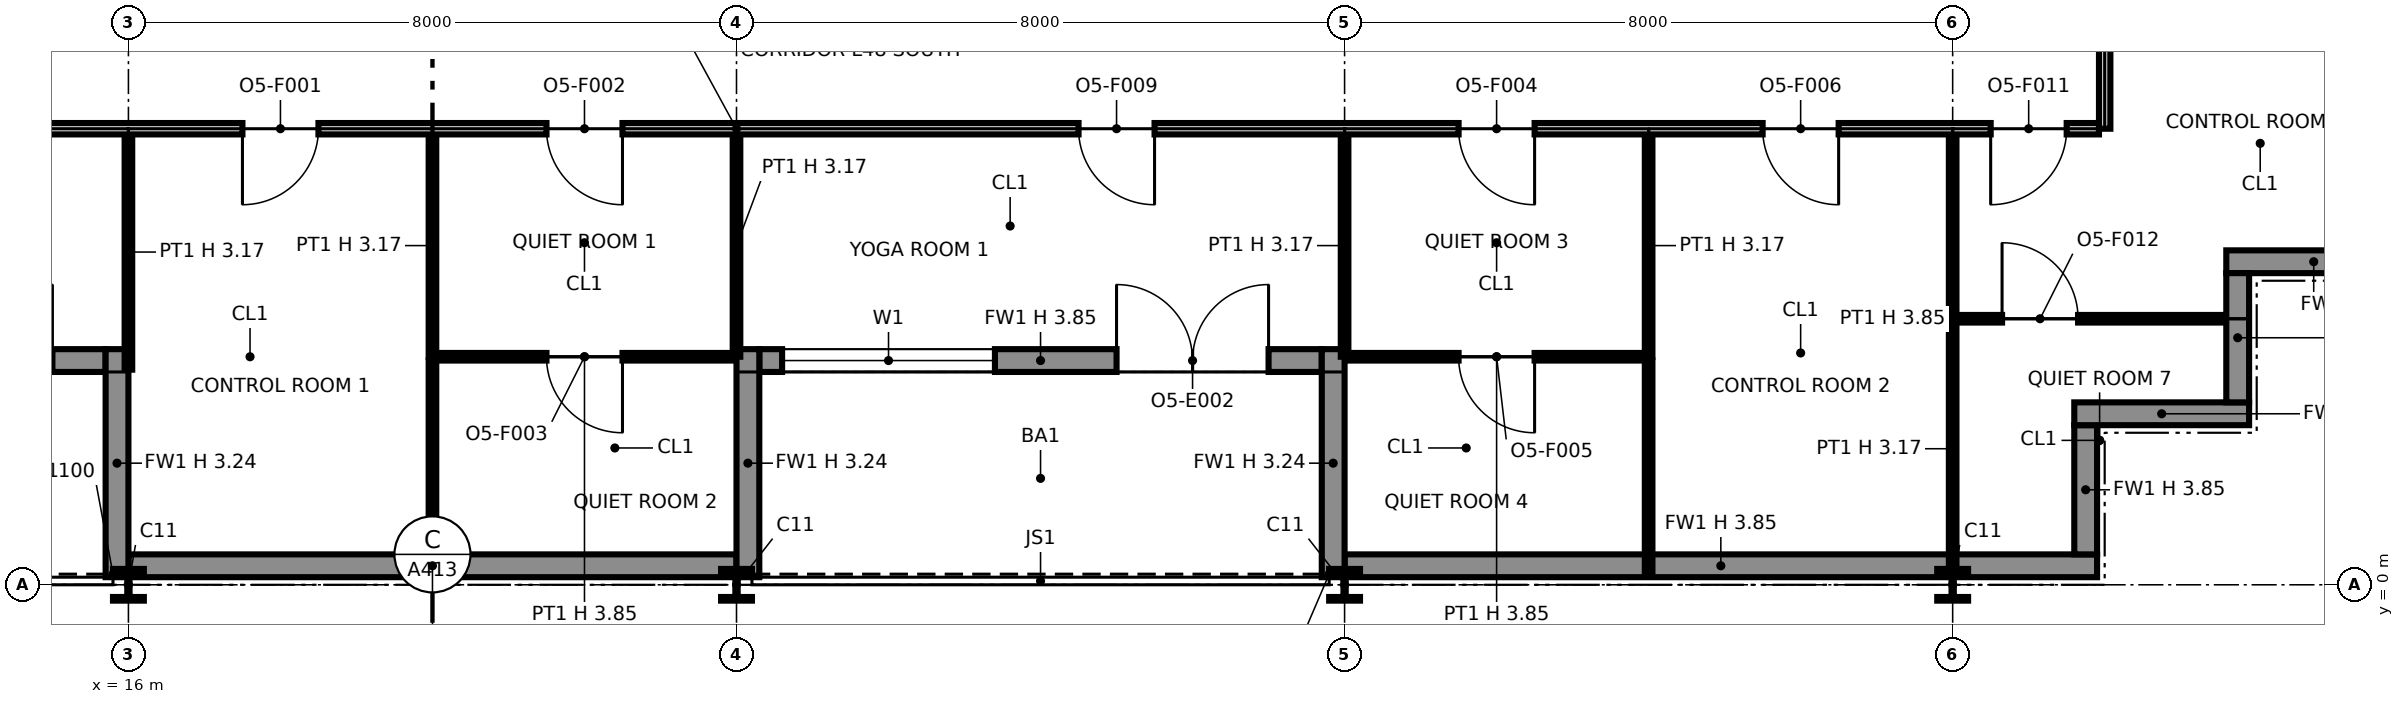
"""IFC4 building model, lengths in metres.
Left out: names, types, materials, properties, quantities, classifications, styles, units other than length and angle.
Written with IfcOpenShell. Run it as: python <this file> out.ifc"""

import sys

from ifc_helpers import new_model, si_unit, direction, frame, frame_2d, origin, origin_2d, place, context, subcontext, project, spatial, polyline, rectangle, i_section, outline, extrude, element, fill, save


model = new_model("IFC4")
c1 = context("Model", 3, precision=1e-05, world=origin(), true_north=direction((0.0, 1.0)))
c2 = subcontext(c1, "Body", "Model", "MODEL_VIEW")
j1 = project(units=[si_unit("LENGTHUNIT", "METRE"), si_unit("PLANEANGLEUNIT", "RADIAN")], contexts=[c1])
p1 = place(None, origin())
s1 = spatial("IfcSite", under=j1, at=p1, CompositionType="ELEMENT")
p2 = place(p1, origin())
s2 = spatial("IfcBuilding", under=s1, at=p2, CompositionType="ELEMENT")
p3 = place(p2, frame((0.0, 0.0, 225.0)))
s3 = spatial("IfcBuildingStorey", under=s2, at=p3, CompositionType="ELEMENT", Elevation=225.0)
for number, where, z_axis, x_axis in (
    (1, (16.0, 0.0, 0.0), (0.0, 0.0, 1.0), (1.0, 0.0, 0.0)),
    (2, (24.0, 0.0, 0.0), (0.0, 0.0, 1.0), (1.0, 0.0, 0.0)),
    (3, (32.0, 0.0, 0.0), (0.0, 0.0, 1.0), (1.0, 0.0, 0.0)),
    (4, (40.0, 0.0, 0.0), (0.0, 0.0, 1.0), (1.0, 0.0, 0.0)),
):
    element("IfcColumn", number, at=place(p3, frame(where, z_axis=z_axis, x_axis=x_axis)), inside=s3, PredefinedType="COLUMN", context=c2, shape_type="SweptSolid", body=[
        extrude(i_section(OverallWidth=0.406, OverallDepth=0.417, WebThickness=0.03, FlangeThickness=0.048, at=origin_2d()), origin(), (0.0, 0.0, 1.0), 3.85),
    ])
p4 = place(p3, frame((8.3, 2.95, 0.0), z_axis=(0.0, 0.0, 1.0), x_axis=(1.0, 0.0, 0.0)))
e5 = element("IfcWall", 5, at=p4, inside=s3, PredefinedType="SOLIDWALL", context=c2, shape_type="SweptSolid", body=[
    extrude(rectangle(XDim=7.4, YDim=0.3, at=frame_2d((3.7, 0.0))), origin(), (0.0, 0.0, 1.0), 3.85),
])
p5 = place(p4, frame((0.3, 0.0, 0.9)))
e6 = element("IfcOpeningElement", 6, at=p5, cuts=e5, PredefinedType="OPENING", context=c2, shape_type="SweptSolid", body=[
    extrude(rectangle(XDim=2.8, YDim=2.2, at=frame_2d((1.4, 1.1))), frame((0.0, 0.16, 0.0), z_axis=(0.0, -1.0, 0.0), x_axis=(1.0, 0.0, 0.0)), (0.0, 0.0, 1.0), 0.32),
])
p6 = place(p4, frame((4.7, 0.0, 0.0)))
e7 = element("IfcOpeningElement", 7, at=p6, cuts=e5, PredefinedType="OPENING", context=c2, shape_type="SweptSolid", body=[
    extrude(rectangle(XDim=2.0, YDim=2.4, at=frame_2d((1.0, 1.2))), frame((0.0, 0.16, 0.0), z_axis=(0.0, -1.0, 0.0), x_axis=(1.0, 0.0, 0.0)), (0.0, 0.0, 1.0), 0.32),
])
p7 = place(p3, frame((15.85, 0.1, 0.0), z_axis=(0.0, 0.0, 1.0), x_axis=(0.0, 1.0, 0.0)))
e8 = element("IfcWall", 8, at=p7, inside=s3, PredefinedType="SOLIDWALL", context=c2, shape_type="SweptSolid", body=[
    extrude(rectangle(XDim=3.0, YDim=0.3, at=frame_2d((1.5, 0.0))), origin(), (0.0, 0.0, 1.0), 3.237),
])
p8 = place(p3, frame((16.0, 0.25, 0.0), z_axis=(0.0, 0.0, 1.0), x_axis=(1.0, 0.0, 0.0)))
e9 = element("IfcWall", 9, at=p8, inside=s3, PredefinedType="SOLIDWALL", context=c2, shape_type="SweptSolid", body=[
    extrude(rectangle(XDim=8.0, YDim=0.3, at=frame_2d((4.0, 0.0))), origin(), (0.0, 0.0, 1.0), 3.85),
])
p9 = place(p3, frame((24.3, 2.95, 0.0), z_axis=(0.0, 0.0, 1.0), x_axis=(1.0, 0.0, 0.0)))
e10 = element("IfcWall", 10, at=p9, inside=s3, PredefinedType="SOLIDWALL", context=c2, shape_type="SweptSolid", body=[
    extrude(rectangle(XDim=7.4, YDim=0.3, at=frame_2d((3.7, 0.0))), origin(), (0.0, 0.0, 1.0), 3.85),
])
p10 = place(p9, frame((0.3, 0.0, 0.9)))
e11 = element("IfcOpeningElement", 11, at=p10, cuts=e10, PredefinedType="OPENING", context=c2, shape_type="SweptSolid", body=[
    extrude(rectangle(XDim=2.8, YDim=2.2, at=frame_2d((1.4, 1.1))), frame((0.0, 0.16, 0.0), z_axis=(0.0, -1.0, 0.0), x_axis=(1.0, 0.0, 0.0)), (0.0, 0.0, 1.0), 0.32),
])
p11 = place(p9, frame((4.7, 0.0, 0.0)))
e12 = element("IfcOpeningElement", 12, at=p11, cuts=e10, PredefinedType="OPENING", context=c2, shape_type="SweptSolid", body=[
    extrude(rectangle(XDim=2.0, YDim=2.4, at=frame_2d((1.0, 1.2))), frame((0.0, 0.16, 0.0), z_axis=(0.0, -1.0, 0.0), x_axis=(1.0, 0.0, 0.0)), (0.0, 0.0, 1.0), 0.32),
])
for number, where, z_axis, x_axis in (
    (13, (24.15, 0.1, 0.0), (0.0, 0.0, 1.0), (0.0, 1.0, 0.0)),
    (14, (31.85, 0.1, 0.0), (0.0, 0.0, 1.0), (0.0, 1.0, 0.0)),
):
    element("IfcWall", number, at=place(p3, frame(where, z_axis=z_axis, x_axis=x_axis)), inside=s3, PredefinedType="SOLIDWALL", context=c2, shape_type="SweptSolid", body=[
        extrude(rectangle(XDim=3.0, YDim=0.3, at=frame_2d((1.5, 0.0))), origin(), (0.0, 0.0, 1.0), 3.237),
    ])
p12 = place(p3, frame((32.0, 0.25, 0.0), z_axis=(0.0, 0.0, 1.0), x_axis=(1.0, 0.0, 0.0)))
e15 = element("IfcWall", 15, at=p12, inside=s3, PredefinedType="SOLIDWALL", context=c2, shape_type="SweptSolid", body=[
    extrude(rectangle(XDim=9.9, YDim=0.3, at=frame_2d((4.95, 0.0))), origin(), (0.0, 0.0, 1.0), 3.85),
])
p13 = place(p3, frame((41.75, 0.4, 0.0), z_axis=(0.0, 0.0, 1.0), x_axis=(0.0, 1.0, 0.0)))
e16 = element("IfcWall", 16, at=p13, inside=s3, PredefinedType="SOLIDWALL", context=c2, shape_type="SweptSolid", body=[
    extrude(rectangle(XDim=1.7, YDim=0.3, at=frame_2d((0.85, 0.0))), origin(), (0.0, 0.0, 1.0), 3.85),
])
p14 = place(p3, frame((41.6, 2.25, 0.0), z_axis=(0.0, 0.0, 1.0), x_axis=(1.0, 0.0, 0.0)))
e17 = element("IfcWall", 17, at=p14, inside=s3, PredefinedType="SOLIDWALL", context=c2, shape_type="SweptSolid", body=[
    extrude(rectangle(XDim=2.3, YDim=0.3, at=frame_2d((1.15, 0.0))), origin(), (0.0, 0.0, 1.0), 3.85),
])
p15 = place(p3, frame((43.75, 2.4, 0.0), z_axis=(0.0, 0.0, 1.0), x_axis=(0.0, 1.0, 0.0)))
e18 = element("IfcWall", 18, at=p15, inside=s3, PredefinedType="SOLIDWALL", context=c2, shape_type="SweptSolid", body=[
    extrude(rectangle(XDim=1.7, YDim=0.3, at=frame_2d((0.85, 0.0))), origin(), (0.0, 0.0, 1.0), 3.85),
])
p16 = place(p3, frame((43.6, 4.25, 0.0), z_axis=(0.0, 0.0, 1.0), x_axis=(1.0, 0.0, 0.0)))
e19 = element("IfcWall", 19, at=p16, inside=s3, PredefinedType="SOLIDWALL", context=c2, shape_type="SweptSolid", body=[
    extrude(rectangle(XDim=2.3, YDim=0.3, at=frame_2d((1.15, 0.0))), origin(), (0.0, 0.0, 1.0), 3.85),
])
for number, where, z_axis, x_axis in (
    (20, (20.0, 0.13, 0.0), (0.0, 0.0, 1.0), (0.0, 1.0, 0.0)),
    (21, (36.0, 0.13, 0.0), (0.0, 0.0, 1.0), (0.0, 1.0, 0.0)),
):
    element("IfcWall", number, at=place(p3, frame(where, z_axis=z_axis, x_axis=x_axis)), inside=s3, PredefinedType="PARTITIONING", context=c2, shape_type="SweptSolid", body=[
        extrude(rectangle(XDim=2.82, YDim=0.1, at=frame_2d((1.41, 0.0))), origin(), (0.0, 0.0, 1.0), 3.85),
    ])
p17 = place(p3, frame((40.0, 0.13, 0.0), z_axis=(0.0, 0.0, 1.0), x_axis=(0.0, 1.0, 0.0)))
e22 = element("IfcWall", 22, at=p17, inside=s3, PredefinedType="PARTITIONING", context=c2, shape_type="SweptSolid", body=[
    extrude(rectangle(XDim=3.32, YDim=0.1, at=frame_2d((1.66, 0.0))), origin(), (0.0, 0.0, 1.0), 3.172),
])
p18 = place(p3, frame((16.0, 2.83, 0.0), z_axis=(0.0, 0.0, 1.0), x_axis=(0.0, 1.0, 0.0)))
e23 = element("IfcWall", 23, at=p18, inside=s3, PredefinedType="PARTITIONING", context=c2, shape_type="SweptSolid", body=[
    extrude(rectangle(XDim=3.095, YDim=0.1, at=frame_2d((1.547, 0.0))), origin(), (0.0, 0.0, 1.0), 3.172),
])
p19 = place(p3, frame((20.05, 3.0, 0.0), z_axis=(0.0, 0.0, 1.0), x_axis=(1.0, 0.0, 0.0)))
e24 = element("IfcWall", 24, at=p19, inside=s3, PredefinedType="PARTITIONING", context=c2, shape_type="SweptSolid", body=[
    extrude(rectangle(XDim=3.9, YDim=0.1, at=frame_2d((1.95, 0.0))), origin(), (0.0, 0.0, 1.0), 3.85),
])
p20 = place(p19, frame((2.45, 0.0, 0.0), z_axis=(0.0, 0.0, 1.0), x_axis=(-1.0, 0.0, 0.0)))
e25 = element("IfcOpeningElement", 25, at=p20, cuts=e24, PredefinedType="OPENING", context=c2, shape_type="SweptSolid", body=[
    extrude(rectangle(XDim=1.0, YDim=2.1, at=frame_2d((0.5, 1.05))), frame((0.0, 0.06, 0.0), z_axis=(0.0, -1.0, 0.0), x_axis=(1.0, 0.0, 0.0)), (0.0, 0.0, 1.0), 0.12),
])
for number, where, z_axis, x_axis in (
    (26, (20.0, 3.0, 0.0), (0.0, 0.0, 1.0), (0.0, 1.0, 0.0)),
    (27, (24.0, 3.0, 0.0), (0.0, 0.0, 1.0), (0.0, 1.0, 0.0)),
):
    element("IfcWall", number, at=place(p3, frame(where, z_axis=z_axis, x_axis=x_axis)), inside=s3, PredefinedType="PARTITIONING", context=c2, shape_type="SweptSolid", body=[
        extrude(rectangle(XDim=2.925, YDim=0.1, at=frame_2d((1.462, 0.0))), origin(), (0.0, 0.0, 1.0), 3.172),
    ])
p21 = place(p3, frame((32.05, 3.0, 0.0), z_axis=(0.0, 0.0, 1.0), x_axis=(1.0, 0.0, 0.0)))
e28 = element("IfcWall", 28, at=p21, inside=s3, PredefinedType="PARTITIONING", context=c2, shape_type="SweptSolid", body=[
    extrude(rectangle(XDim=3.9, YDim=0.1, at=frame_2d((1.95, 0.0))), origin(), (0.0, 0.0, 1.0), 3.85),
])
p22 = place(p21, frame((2.45, 0.0, 0.0), z_axis=(0.0, 0.0, 1.0), x_axis=(-1.0, 0.0, 0.0)))
e29 = element("IfcOpeningElement", 29, at=p22, cuts=e28, PredefinedType="OPENING", context=c2, shape_type="SweptSolid", body=[
    extrude(rectangle(XDim=1.0, YDim=2.1, at=frame_2d((0.5, 1.05))), frame((0.0, 0.06, 0.0), z_axis=(0.0, -1.0, 0.0), x_axis=(1.0, 0.0, 0.0)), (0.0, 0.0, 1.0), 0.12),
])
for number, where, z_axis, x_axis in (
    (30, (32.0, 3.0, 0.0), (0.0, 0.0, 1.0), (0.0, 1.0, 0.0)),
    (31, (36.0, 3.0, 0.0), (0.0, 0.0, 1.0), (0.0, 1.0, 0.0)),
):
    element("IfcWall", number, at=place(p3, frame(where, z_axis=z_axis, x_axis=x_axis)), inside=s3, PredefinedType="PARTITIONING", context=c2, shape_type="SweptSolid", body=[
        extrude(rectangle(XDim=2.925, YDim=0.1, at=frame_2d((1.462, 0.0))), origin(), (0.0, 0.0, 1.0), 3.172),
    ])
p23 = place(p3, frame((40.05, 3.5, 0.0), z_axis=(0.0, 0.0, 1.0), x_axis=(1.0, 0.0, 0.0)))
e32 = element("IfcWall", 32, at=p23, inside=s3, PredefinedType="PARTITIONING", context=c2, shape_type="SweptSolid", body=[
    extrude(rectangle(XDim=3.52, YDim=0.1, at=frame_2d((1.76, 0.0))), origin(), (0.0, 0.0, 1.0), 3.85),
])
p24 = place(p23, frame((0.6, 0.0, 0.0)))
e33 = element("IfcOpeningElement", 33, at=p24, cuts=e32, PredefinedType="OPENING", context=c2, shape_type="SweptSolid", body=[
    extrude(rectangle(XDim=1.0, YDim=2.1, at=frame_2d((0.5, 1.05))), frame((0.0, 0.06, 0.0), z_axis=(0.0, -1.0, 0.0), x_axis=(1.0, 0.0, 0.0)), (0.0, 0.0, 1.0), 0.12),
])
p25 = place(p3, frame((40.0, 3.5, 0.0), z_axis=(0.0, 0.0, 1.0), x_axis=(0.0, 1.0, 0.0)))
e34 = element("IfcWall", 34, at=p25, inside=s3, PredefinedType="PARTITIONING", context=c2, shape_type="SweptSolid", body=[
    extrude(rectangle(XDim=2.425, YDim=0.1, at=frame_2d((1.212, 0.0))), origin(), (0.0, 0.0, 1.0), 3.172),
])
p26 = place(p3, frame((6.075, 6.0, 0.0), z_axis=(0.0, 0.0, 1.0), x_axis=(1.0, 0.0, 0.0)))
e35 = element("IfcWall", 35, at=p26, inside=s3, PredefinedType="PARTITIONING", context=c2, shape_type="SweptSolid", body=[
    extrude(rectangle(XDim=35.85, YDim=0.15, at=frame_2d((17.925, 0.0))), origin(), (0.0, 0.0, 1.0), 3.85),
])
p27 = place(p26, frame((12.425, 0.0, 0.0), z_axis=(0.0, 0.0, 1.0), x_axis=(-1.0, 0.0, 0.0)))
e36 = element("IfcOpeningElement", 36, at=p27, cuts=e35, PredefinedType="OPENING", context=c2, shape_type="SweptSolid", body=[
    extrude(rectangle(XDim=1.0, YDim=2.1, at=frame_2d((0.5, 1.05))), frame((0.0, 0.085, 0.0), z_axis=(0.0, -1.0, 0.0), x_axis=(1.0, 0.0, 0.0)), (0.0, 0.0, 1.0), 0.17),
])
p28 = place(p26, frame((16.425, 0.0, 0.0), z_axis=(0.0, 0.0, 1.0), x_axis=(-1.0, 0.0, 0.0)))
e37 = element("IfcOpeningElement", 37, at=p28, cuts=e35, PredefinedType="OPENING", context=c2, shape_type="SweptSolid", body=[
    extrude(rectangle(XDim=1.0, YDim=2.1, at=frame_2d((0.5, 1.05))), frame((0.0, 0.085, 0.0), z_axis=(0.0, -1.0, 0.0), x_axis=(1.0, 0.0, 0.0)), (0.0, 0.0, 1.0), 0.17),
])
p29 = place(p26, frame((28.425, 0.0, 0.0), z_axis=(0.0, 0.0, 1.0), x_axis=(-1.0, 0.0, 0.0)))
e38 = element("IfcOpeningElement", 38, at=p29, cuts=e35, PredefinedType="OPENING", context=c2, shape_type="SweptSolid", body=[
    extrude(rectangle(XDim=1.0, YDim=2.1, at=frame_2d((0.5, 1.05))), frame((0.0, 0.085, 0.0), z_axis=(0.0, -1.0, 0.0), x_axis=(1.0, 0.0, 0.0)), (0.0, 0.0, 1.0), 0.17),
])
p30 = place(p26, frame((32.425, 0.0, 0.0), z_axis=(0.0, 0.0, 1.0), x_axis=(-1.0, 0.0, 0.0)))
e39 = element("IfcOpeningElement", 39, at=p30, cuts=e35, PredefinedType="OPENING", context=c2, shape_type="SweptSolid", body=[
    extrude(rectangle(XDim=1.0, YDim=2.1, at=frame_2d((0.5, 1.05))), frame((0.0, 0.085, 0.0), z_axis=(0.0, -1.0, 0.0), x_axis=(1.0, 0.0, 0.0)), (0.0, 0.0, 1.0), 0.17),
])
p31 = place(p26, frame((4.425, 0.0, 0.0), z_axis=(0.0, 0.0, 1.0), x_axis=(-1.0, 0.0, 0.0)))
e40 = element("IfcOpeningElement", 40, at=p31, cuts=e35, PredefinedType="OPENING", context=c2, shape_type="SweptSolid", body=[
    extrude(rectangle(XDim=1.0, YDim=2.1, at=frame_2d((0.5, 1.05))), frame((0.0, 0.085, 0.0), z_axis=(0.0, -1.0, 0.0), x_axis=(1.0, 0.0, 0.0)), (0.0, 0.0, 1.0), 0.17),
])
p32 = place(p26, frame((8.425, 0.0, 0.0), z_axis=(0.0, 0.0, 1.0), x_axis=(-1.0, 0.0, 0.0)))
e41 = element("IfcOpeningElement", 41, at=p32, cuts=e35, PredefinedType="OPENING", context=c2, shape_type="SweptSolid", body=[
    extrude(rectangle(XDim=1.0, YDim=2.1, at=frame_2d((0.5, 1.05))), frame((0.0, 0.085, 0.0), z_axis=(0.0, -1.0, 0.0), x_axis=(1.0, 0.0, 0.0)), (0.0, 0.0, 1.0), 0.17),
])
p33 = place(p26, frame((23.425, 0.0, 0.0), z_axis=(0.0, 0.0, 1.0), x_axis=(-1.0, 0.0, 0.0)))
e42 = element("IfcOpeningElement", 42, at=p33, cuts=e35, PredefinedType="OPENING", context=c2, shape_type="SweptSolid", body=[
    extrude(rectangle(XDim=1.0, YDim=2.1, at=frame_2d((0.5, 1.05))), frame((0.0, 0.085, 0.0), z_axis=(0.0, -1.0, 0.0), x_axis=(1.0, 0.0, 0.0)), (0.0, 0.0, 1.0), 0.17),
])
p34 = place(p26, frame((35.425, 0.0, 0.0), z_axis=(0.0, 0.0, 1.0), x_axis=(-1.0, 0.0, 0.0)))
e43 = element("IfcOpeningElement", 43, at=p34, cuts=e35, PredefinedType="OPENING", context=c2, shape_type="SweptSolid", body=[
    extrude(rectangle(XDim=1.0, YDim=2.1, at=frame_2d((0.5, 1.05))), frame((0.0, 0.085, 0.0), z_axis=(0.0, -1.0, 0.0), x_axis=(1.0, 0.0, 0.0)), (0.0, 0.0, 1.0), 0.17),
])
p35 = place(p3, frame((42.0, 6.0, 0.0), z_axis=(0.0, 0.0, 1.0), x_axis=(0.0, 1.0, 0.0)))
e44 = element("IfcWall", 44, at=p35, inside=s3, PredefinedType="PARTITIONING", context=c2, shape_type="SweptSolid", body=[
    extrude(outline(polyline([(0.0, 0.0), (11.925, 0.0), (11.925, 3.85), (10.3, 3.85), (10.298, 3.172), (9.702, 3.172), (9.7, 3.85), (6.3, 3.85), (6.298, 3.172), (5.702, 3.172), (5.7, 3.85), (2.3, 3.85), (2.298, 3.172), (1.702, 3.172), (1.7, 3.85), (0.0, 3.85), (0.0, 0.0)])), frame((0.0, 0.075, 0.0), z_axis=(0.0, -1.0, 0.0), x_axis=(1.0, 0.0, 0.0)), (0.0, 0.0, 1.0), 0.15),
])
p36 = place(p35, frame((4.5, 0.0, 0.0), z_axis=(0.0, 0.0, 1.0), x_axis=(-1.0, 0.0, 0.0)))
e45 = element("IfcOpeningElement", 45, at=p36, cuts=e44, PredefinedType="OPENING", context=c2, shape_type="SweptSolid", body=[
    extrude(rectangle(XDim=1.0, YDim=2.1, at=frame_2d((0.5, 1.05))), frame((0.0, 0.085, 0.0), z_axis=(0.0, -1.0, 0.0), x_axis=(1.0, 0.0, 0.0)), (0.0, 0.0, 1.0), 0.17),
])
p37 = place(p35, frame((8.5, 0.0, 0.0), z_axis=(0.0, 0.0, 1.0), x_axis=(-1.0, 0.0, 0.0)))
e46 = element("IfcOpeningElement", 46, at=p37, cuts=e44, PredefinedType="OPENING", context=c2, shape_type="SweptSolid", body=[
    extrude(rectangle(XDim=1.0, YDim=2.1, at=frame_2d((0.5, 1.05))), frame((0.0, 0.085, 0.0), z_axis=(0.0, -1.0, 0.0), x_axis=(1.0, 0.0, 0.0)), (0.0, 0.0, 1.0), 0.17),
])
p38 = place(p35, frame((11.5, 0.0, 0.0), z_axis=(0.0, 0.0, 1.0), x_axis=(-1.0, 0.0, 0.0)))
e47 = element("IfcOpeningElement", 47, at=p38, cuts=e44, PredefinedType="OPENING", context=c2, shape_type="SweptSolid", body=[
    extrude(rectangle(XDim=1.0, YDim=2.1, at=frame_2d((0.5, 1.05))), frame((0.0, 0.085, 0.0), z_axis=(0.0, -1.0, 0.0), x_axis=(1.0, 0.0, 0.0)), (0.0, 0.0, 1.0), 0.17),
])
p39 = place(p10, origin())
e48 = element("IfcWindow", 48, at=p39, inside=s3, PartitioningType="SINGLE_PANEL", PredefinedType="WINDOW", context=c2, shape_type="SweptSolid", body=[
    extrude(rectangle(XDim=2.8, YDim=2.2, at=frame_2d((1.4, 1.1))), frame((0.0, 0.03, 0.0), z_axis=(0.0, -1.0, 0.0), x_axis=(1.0, 0.0, 0.0)), (0.0, 0.0, 1.0), 0.06),
])
fill(e11, e48)
p40 = place(p11, origin())
e49 = element("IfcDoor", 49, at=p40, inside=s3, OperationType="DOUBLE_DOOR_SINGLE_SWING", PredefinedType="DOOR", context=c2, shape_type="SweptSolid", body=[
    extrude(rectangle(XDim=2.0, YDim=2.4, at=frame_2d((1.0, 1.2))), frame((0.0, 0.025, 0.0), z_axis=(0.0, -1.0, 0.0), x_axis=(1.0, 0.0, 0.0)), (0.0, 0.0, 1.0), 0.05),
])
fill(e12, e49)
p41 = place(p27, origin())
e50 = element("IfcDoor", 50, at=p41, inside=s3, OperationType="SINGLE_SWING_RIGHT", PredefinedType="DOOR", context=c2, shape_type="SweptSolid", body=[
    extrude(rectangle(XDim=1.0, YDim=2.1, at=frame_2d((0.5, 1.05))), frame((0.0, 0.025, 0.0), z_axis=(0.0, -1.0, 0.0), x_axis=(1.0, 0.0, 0.0)), (0.0, 0.0, 1.0), 0.05),
])
fill(e36, e50)
p42 = place(p28, origin())
e51 = element("IfcDoor", 51, at=p42, inside=s3, OperationType="SINGLE_SWING_LEFT", PredefinedType="DOOR", context=c2, shape_type="SweptSolid", body=[
    extrude(rectangle(XDim=1.0, YDim=2.1, at=frame_2d((0.5, 1.05))), frame((0.0, 0.025, 0.0), z_axis=(0.0, -1.0, 0.0), x_axis=(1.0, 0.0, 0.0)), (0.0, 0.0, 1.0), 0.05),
])
fill(e37, e51)
p43 = place(p20, origin())
e52 = element("IfcDoor", 52, at=p43, inside=s3, OperationType="SINGLE_SWING_LEFT", PredefinedType="DOOR", context=c2, shape_type="SweptSolid", body=[
    extrude(rectangle(XDim=1.0, YDim=2.1, at=frame_2d((0.5, 1.05))), frame((0.0, 0.025, 0.0), z_axis=(0.0, -1.0, 0.0), x_axis=(1.0, 0.0, 0.0)), (0.0, 0.0, 1.0), 0.05),
])
fill(e25, e52)
p44 = place(p29, origin())
e53 = element("IfcDoor", 53, at=p44, inside=s3, OperationType="SINGLE_SWING_LEFT", PredefinedType="DOOR", context=c2, shape_type="SweptSolid", body=[
    extrude(rectangle(XDim=1.0, YDim=2.1, at=frame_2d((0.5, 1.05))), frame((0.0, 0.025, 0.0), z_axis=(0.0, -1.0, 0.0), x_axis=(1.0, 0.0, 0.0)), (0.0, 0.0, 1.0), 0.05),
])
fill(e38, e53)
p45 = place(p22, origin())
e54 = element("IfcDoor", 54, at=p45, inside=s3, OperationType="SINGLE_SWING_LEFT", PredefinedType="DOOR", context=c2, shape_type="SweptSolid", body=[
    extrude(rectangle(XDim=1.0, YDim=2.1, at=frame_2d((0.5, 1.05))), frame((0.0, 0.025, 0.0), z_axis=(0.0, -1.0, 0.0), x_axis=(1.0, 0.0, 0.0)), (0.0, 0.0, 1.0), 0.05),
])
fill(e29, e54)
p46 = place(p30, origin())
e55 = element("IfcDoor", 55, at=p46, inside=s3, OperationType="SINGLE_SWING_LEFT", PredefinedType="DOOR", context=c2, shape_type="SweptSolid", body=[
    extrude(rectangle(XDim=1.0, YDim=2.1, at=frame_2d((0.5, 1.05))), frame((0.0, 0.025, 0.0), z_axis=(0.0, -1.0, 0.0), x_axis=(1.0, 0.0, 0.0)), (0.0, 0.0, 1.0), 0.05),
])
fill(e39, e55)
p47 = place(p33, origin())
e56 = element("IfcDoor", 56, at=p47, inside=s3, OperationType="SINGLE_SWING_LEFT", PredefinedType="DOOR", context=c2, shape_type="SweptSolid", body=[
    extrude(rectangle(XDim=1.0, YDim=2.1, at=frame_2d((0.5, 1.05))), frame((0.0, 0.025, 0.0), z_axis=(0.0, -1.0, 0.0), x_axis=(1.0, 0.0, 0.0)), (0.0, 0.0, 1.0), 0.05),
])
fill(e42, e56)
p48 = place(p34, origin())
e57 = element("IfcDoor", 57, at=p48, inside=s3, OperationType="SINGLE_SWING_RIGHT", PredefinedType="DOOR", context=c2, shape_type="SweptSolid", body=[
    extrude(rectangle(XDim=1.0, YDim=2.1, at=frame_2d((0.5, 1.05))), frame((0.0, 0.025, 0.0), z_axis=(0.0, -1.0, 0.0), x_axis=(1.0, 0.0, 0.0)), (0.0, 0.0, 1.0), 0.05),
])
fill(e43, e57)
p49 = place(p24, origin())
e58 = element("IfcDoor", 58, at=p49, inside=s3, OperationType="SINGLE_SWING_LEFT", PredefinedType="DOOR", context=c2, shape_type="SweptSolid", body=[
    extrude(rectangle(XDim=1.0, YDim=2.1, at=frame_2d((0.5, 1.05))), frame((0.0, 0.025, 0.0), z_axis=(0.0, -1.0, 0.0), x_axis=(1.0, 0.0, 0.0)), (0.0, 0.0, 1.0), 0.05),
])
fill(e33, e58)
save(model, sys.argv[1])
